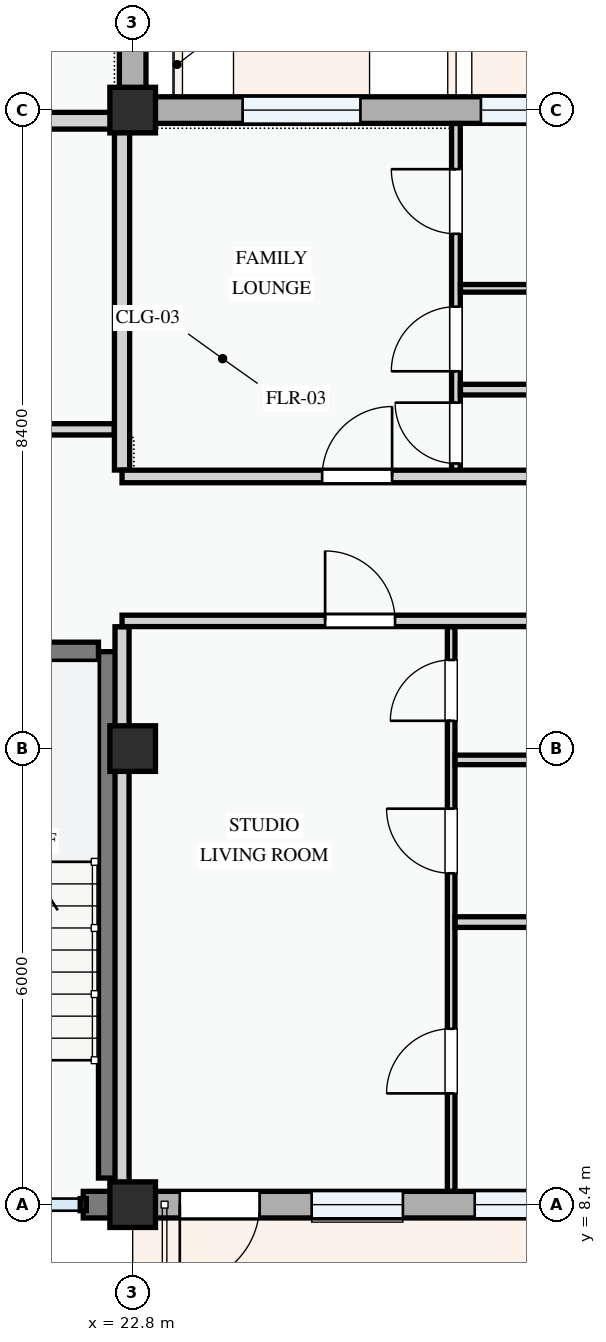
"""IFC4 building model, lengths in metres.
Left out: names, types, materials, properties, quantities, classifications, styles, units other than length and angle.
Written with IfcOpenShell. Run it as: python <this file> out.ifc"""

import sys

from ifc_helpers import new_model, si_unit, direction, frame, frame_2d, origin, origin_2d, place, context, subcontext, project, spatial, rectangle, extrude, element, fill, save


model = new_model("IFC4")
c1 = context("Model", 3, precision=1e-05, world=origin(), true_north=direction((0.0, 1.0)))
c2 = subcontext(c1, "Body", "Model", "MODEL_VIEW")
j1 = project(units=[si_unit("LENGTHUNIT", "METRE"), si_unit("PLANEANGLEUNIT", "RADIAN")], contexts=[c1])
p1 = place(None, origin())
s1 = spatial("IfcSite", under=j1, at=p1, CompositionType="ELEMENT")
p2 = place(p1, origin())
s2 = spatial("IfcBuilding", under=s1, at=p2, CompositionType="ELEMENT")
p3 = place(p2, frame((0.0, 0.0, 8.1)))
s3 = spatial("IfcBuildingStorey", under=s2, at=p3, CompositionType="ELEMENT", Elevation=8.1)
for number, where, z_axis, x_axis in (
    (1, (22.8, 8.4, 0.0), (0.0, 0.0, 1.0), (1.0, 0.0, 0.0)),
    (2, (22.8, 14.4, 0.0), (0.0, 0.0, 1.0), (1.0, 0.0, 0.0)),
    (3, (22.8, 22.8, 0.0), (0.0, 0.0, 1.0), (1.0, 0.0, 0.0)),
):
    element("IfcColumn", number, at=place(p3, frame(where, z_axis=z_axis, x_axis=x_axis)), inside=s3, PredefinedType="COLUMN", context=c2, shape_type="SweptSolid", body=[
        extrude(rectangle(XDim=0.6, YDim=0.6, at=origin_2d()), origin(), (0.0, 0.0, 1.0), 3.3),
    ])
p4 = place(p3, frame((22.8, 22.8, 0.0), z_axis=(0.0, 0.0, 1.0), x_axis=(0.0, 1.0, 0.0)))
e4 = element("IfcWall", 4, at=p4, inside=s3, PredefinedType="STANDARD", context=c2, shape_type="SweptSolid", body=[
    extrude(rectangle(XDim=6.0, YDim=0.35, at=frame_2d((3.0, 0.0))), origin(), (0.0, 0.0, 1.0), 2.575),
])
p5 = place(p4, frame((1.481, 0.0, 0.78)))
e5 = element("IfcOpeningElement", 5, at=p5, cuts=e4, PredefinedType="OPENING", context=c2, shape_type="SweptSolid", body=[
    extrude(rectangle(XDim=1.48, YDim=1.52, at=frame_2d((0.74, 0.76))), frame((0.0, 0.185, 0.0), z_axis=(0.0, -1.0, 0.0), x_axis=(1.0, 0.0, 0.0)), (0.0, 0.0, 1.0), 0.37),
])
p6 = place(p4, frame((4.581, 0.0, 0.78)))
e6 = element("IfcOpeningElement", 6, at=p6, cuts=e4, PredefinedType="OPENING", context=c2, shape_type="SweptSolid", body=[
    extrude(rectangle(XDim=0.9, YDim=1.2, at=frame_2d((0.45, 0.6))), frame((0.0, 0.185, 0.0), z_axis=(0.0, -1.0, 0.0), x_axis=(1.0, 0.0, 0.0)), (0.0, 0.0, 1.0), 0.37),
])
p7 = place(p3, frame((22.15, 8.4, 0.0), z_axis=(0.0, 0.0, 1.0), x_axis=(1.0, 0.0, 0.0)))
e7 = element("IfcWall", 7, at=p7, inside=s3, PredefinedType="STANDARD", context=c2, shape_type="SweptSolid", body=[
    extrude(rectangle(XDim=0.65, YDim=0.35, at=frame_2d((0.325, 0.0))), origin(), (0.0, 0.0, 1.0), 3.04),
])
p8 = place(p3, frame((22.8, 8.4, 0.0), z_axis=(0.0, 0.0, 1.0), x_axis=(1.0, 0.0, 0.0)))
e8 = element("IfcWall", 8, at=p8, inside=s3, PredefinedType="STANDARD", context=c2, shape_type="SweptSolid", body=[
    extrude(rectangle(XDim=6.0, YDim=0.35, at=frame_2d((3.0, 0.0))), origin(), (0.0, 0.0, 1.0), 2.475),
])
p9 = place(p8, frame((0.62, 0.0, 0.0)))
e9 = element("IfcOpeningElement", 9, at=p9, cuts=e8, PredefinedType="OPENING", context=c2, shape_type="SweptSolid", body=[
    extrude(rectangle(XDim=1.05, YDim=2.15, at=frame_2d((0.525, 1.075))), frame((0.0, 0.185, 0.0), z_axis=(0.0, -1.0, 0.0), x_axis=(1.0, 0.0, 0.0)), (0.0, 0.0, 1.0), 0.37),
])
p10 = place(p8, frame((2.355, 0.0, 0.78)))
e10 = element("IfcOpeningElement", 10, at=p10, cuts=e8, PredefinedType="OPENING", context=c2, shape_type="SweptSolid", body=[
    extrude(rectangle(XDim=1.2, YDim=1.5, at=frame_2d((0.6, 0.75))), frame((0.0, 0.185, 0.0), z_axis=(0.0, -1.0, 0.0), x_axis=(1.0, 0.0, 0.0)), (0.0, 0.0, 1.0), 0.37),
])
p11 = place(p8, frame((4.5, 0.0, 0.78)))
e11 = element("IfcOpeningElement", 11, at=p11, cuts=e8, PredefinedType="OPENING", context=c2, shape_type="SweptSolid", body=[
    extrude(rectangle(XDim=1.0, YDim=1.25, at=frame_2d((0.5, 0.625))), frame((0.0, 0.185, 0.0), z_axis=(0.0, -1.0, 0.0), x_axis=(1.0, 0.0, 0.0)), (0.0, 0.0, 1.0), 0.37),
])
p12 = place(p3, frame((28.8, 22.8, 0.0), z_axis=(0.0, 0.0, 1.0), x_axis=(-1.0, 0.0, 0.0)))
e12 = element("IfcWall", 12, at=p12, inside=s3, PredefinedType="STANDARD", context=c2, shape_type="SweptSolid", body=[
    extrude(rectangle(XDim=6.0, YDim=0.35, at=frame_2d((3.0, 0.0))), origin(), (0.0, 0.0, 1.0), 2.475),
])
p13 = place(p12, frame((0.519, 0.0, 0.78)))
e13 = element("IfcOpeningElement", 13, at=p13, cuts=e12, PredefinedType="OPENING", context=c2, shape_type="SweptSolid", body=[
    extrude(rectangle(XDim=0.9, YDim=1.2, at=frame_2d((0.45, 0.6))), frame((0.0, 0.185, 0.0), z_axis=(0.0, -1.0, 0.0), x_axis=(1.0, 0.0, 0.0)), (0.0, 0.0, 1.0), 0.37),
])
p14 = place(p12, frame((3.004, 0.0, 0.78)))
e14 = element("IfcOpeningElement", 14, at=p14, cuts=e12, PredefinedType="OPENING", context=c2, shape_type="SweptSolid", body=[
    extrude(rectangle(XDim=1.55, YDim=1.4, at=frame_2d((0.775, 0.7))), frame((0.0, 0.185, 0.0), z_axis=(0.0, -1.0, 0.0), x_axis=(1.0, 0.0, 0.0)), (0.0, 0.0, 1.0), 0.37),
])
p15 = place(p3, frame((22.475, 8.75, 0.0), z_axis=(0.0, 0.0, 1.0), x_axis=(0.0, 1.0, 0.0)))
e15 = element("IfcWall", 15, at=p15, inside=s3, PredefinedType="SHEAR", context=c2, shape_type="SweptSolid", body=[
    extrude(rectangle(XDim=6.925, YDim=0.25, at=frame_2d((3.462, 0.0))), origin(), (0.0, 0.0, 1.0), 3.0),
])
p16 = place(p3, frame((8.85, 15.675, 0.0), z_axis=(0.0, 0.0, 1.0), x_axis=(1.0, 0.0, 0.0)))
e16 = element("IfcWall", 16, at=p16, inside=s3, PredefinedType="SHEAR", context=c2, shape_type="SweptSolid", body=[
    extrude(rectangle(XDim=13.5, YDim=0.25, at=frame_2d((6.75, 0.0))), origin(), (0.0, 0.0, 1.0), 3.0),
])
p17 = place(p16, frame((6.2, 0.0, 0.0)))
e17 = element("IfcOpeningElement", 17, at=p17, cuts=e16, PredefinedType="OPENING", context=c2, shape_type="SweptSolid", body=[
    extrude(rectangle(XDim=1.1, YDim=2.15, at=frame_2d((0.55, 1.075))), frame((0.0, 0.135, 0.0), z_axis=(0.0, -1.0, 0.0), x_axis=(1.0, 0.0, 0.0)), (0.0, 0.0, 1.0), 0.27),
])
p18 = place(p3, frame((18.025, 18.6, 0.0), z_axis=(0.0, 0.0, 1.0), x_axis=(1.0, 0.0, 0.0)))
e18 = element("IfcWall", 18, at=p18, inside=s3, PredefinedType="PARTITIONING", context=c2, shape_type="SweptSolid", body=[
    extrude(rectangle(XDim=4.533, YDim=0.148, at=frame_2d((2.267, 0.0))), origin(), (0.0, 0.0, 1.0), 3.0),
])
p19 = place(p18, frame((1.65, 0.0, 0.0)))
e19 = element("IfcOpeningElement", 19, at=p19, cuts=e18, PredefinedType="OPENING", context=c2, shape_type="SweptSolid", body=[
    extrude(rectangle(XDim=1.0, YDim=2.15, at=frame_2d((0.5, 1.075))), frame((0.0, 0.084, 0.0), z_axis=(0.0, -1.0, 0.0), x_axis=(1.0, 0.0, 0.0)), (0.0, 0.0, 1.0), 0.168),
])
p20 = place(p3, frame((18.064, 22.66, 0.0), z_axis=(0.0, 0.0, 1.0), x_axis=(1.0, 0.0, 0.0)))
e20 = element("IfcWall", 20, at=p20, inside=s3, PredefinedType="PARTITIONING", context=c2, shape_type="SweptSolid", body=[
    extrude(rectangle(XDim=4.494, YDim=0.22, at=frame_2d((2.247, 0.0))), origin(), (0.0, 0.0, 1.0), 2.375),
])
p21 = place(p3, frame((26.99, 8.577, 0.0), z_axis=(0.0, 0.0, 1.0), x_axis=(0.0, 1.0, 0.0)))
e21 = element("IfcWall", 21, at=p21, inside=s3, PredefinedType="PARTITIONING", context=c2, shape_type="SweptSolid", body=[
    extrude(rectangle(XDim=7.426, YDim=0.1, at=frame_2d((3.713, 0.0))), origin(), (0.0, 0.0, 1.0), 3.0),
])
p22 = place(p21, frame((1.287, 0.0, 0.0)))
e22 = element("IfcOpeningElement", 22, at=p22, cuts=e21, PredefinedType="OPENING", context=c2, shape_type="SweptSolid", body=[
    extrude(rectangle(XDim=0.85, YDim=2.1, at=frame_2d((0.425, 1.05))), frame((0.0, 0.06, 0.0), z_axis=(0.0, -1.0, 0.0), x_axis=(1.0, 0.0, 0.0)), (0.0, 0.0, 1.0), 0.12),
])
p23 = place(p21, frame((4.182, 0.0, 0.0)))
e23 = element("IfcOpeningElement", 23, at=p23, cuts=e21, PredefinedType="OPENING", context=c2, shape_type="SweptSolid", body=[
    extrude(rectangle(XDim=0.85, YDim=2.1, at=frame_2d((0.425, 1.05))), frame((0.0, 0.06, 0.0), z_axis=(0.0, -1.0, 0.0), x_axis=(1.0, 0.0, 0.0)), (0.0, 0.0, 1.0), 0.12),
])
p24 = place(p21, frame((6.189, 0.0, 0.0)))
e24 = element("IfcOpeningElement", 24, at=p24, cuts=e21, PredefinedType="OPENING", context=c2, shape_type="SweptSolid", body=[
    extrude(rectangle(XDim=0.8, YDim=2.1, at=frame_2d((0.4, 1.05))), frame((0.0, 0.06, 0.0), z_axis=(0.0, -1.0, 0.0), x_axis=(1.0, 0.0, 0.0)), (0.0, 0.0, 1.0), 0.12),
])
p25 = place(p3, frame((27.042, 12.118, 0.0), z_axis=(0.0, 0.0, 1.0), x_axis=(1.0, 0.0, 0.0)))
e25 = element("IfcWall", 25, at=p25, inside=s3, PredefinedType="PARTITIONING", context=c2, shape_type="SweptSolid", body=[
    extrude(rectangle(XDim=7.366, YDim=0.14, at=frame_2d((3.683, 0.0))), origin(), (0.0, 0.0, 1.0), 3.0),
])
p26 = place(p3, frame((27.042, 14.251, 0.0), z_axis=(0.0, 0.0, 1.0), x_axis=(1.0, 0.0, 0.0)))
e26 = element("IfcWall", 26, at=p26, inside=s3, PredefinedType="PARTITIONING", context=c2, shape_type="SweptSolid", body=[
    extrude(rectangle(XDim=7.366, YDim=0.125, at=frame_2d((3.683, 0.0))), origin(), (0.0, 0.0, 1.0), 2.375),
])
p27 = place(p3, frame((27.053, 17.98, 0.0), z_axis=(0.0, 0.0, 1.0), x_axis=(0.0, 1.0, 0.0)))
e27 = element("IfcWall", 27, at=p27, inside=s3, PredefinedType="PARTITIONING", context=c2, shape_type="SweptSolid", body=[
    extrude(rectangle(XDim=4.643, YDim=0.115, at=frame_2d((2.322, 0.0))), origin(), (0.0, 0.0, 1.0), 3.0),
])
p28 = place(p27, frame((0.171, 0.0, 0.0)))
e28 = element("IfcOpeningElement", 28, at=p28, cuts=e27, PredefinedType="OPENING", context=c2, shape_type="SweptSolid", body=[
    extrude(rectangle(XDim=0.8, YDim=2.1, at=frame_2d((0.4, 1.05))), frame((0.0, 0.067, 0.0), z_axis=(0.0, -1.0, 0.0), x_axis=(1.0, 0.0, 0.0)), (0.0, 0.0, 1.0), 0.135),
])
p29 = place(p27, frame((1.384, 0.0, 0.0)))
e29 = element("IfcOpeningElement", 29, at=p29, cuts=e27, PredefinedType="OPENING", context=c2, shape_type="SweptSolid", body=[
    extrude(rectangle(XDim=0.85, YDim=2.1, at=frame_2d((0.425, 1.05))), frame((0.0, 0.067, 0.0), z_axis=(0.0, -1.0, 0.0), x_axis=(1.0, 0.0, 0.0)), (0.0, 0.0, 1.0), 0.135),
])
p30 = place(p27, frame((3.193, 0.0, 0.0)))
e30 = element("IfcOpeningElement", 30, at=p30, cuts=e27, PredefinedType="OPENING", context=c2, shape_type="SweptSolid", body=[
    extrude(rectangle(XDim=0.85, YDim=2.1, at=frame_2d((0.425, 1.05))), frame((0.0, 0.067, 0.0), z_axis=(0.0, -1.0, 0.0), x_axis=(1.0, 0.0, 0.0)), (0.0, 0.0, 1.0), 0.135),
])
p31 = place(p3, frame((27.112, 20.455, 0.0), z_axis=(0.0, 0.0, 1.0), x_axis=(1.0, 0.0, 0.0)))
e31 = element("IfcWall", 31, at=p31, inside=s3, PredefinedType="PARTITIONING", context=c2, shape_type="SweptSolid", body=[
    extrude(rectangle(XDim=7.313, YDim=0.1, at=frame_2d((3.657, 0.0))), origin(), (0.0, 0.0, 1.0), 3.0),
])
p32 = place(p3, frame((27.112, 19.122, 0.0), z_axis=(0.0, 0.0, 1.0), x_axis=(1.0, 0.0, 0.0)))
e32 = element("IfcWall", 32, at=p32, inside=s3, PredefinedType="PARTITIONING", context=c2, shape_type="SweptSolid", body=[
    extrude(rectangle(XDim=7.313, YDim=0.14, at=frame_2d((3.657, 0.0))), origin(), (0.0, 0.0, 1.0), 3.0),
])
p33 = place(p3, frame((22.66, 8.577, 0.0), z_axis=(0.0, 0.0, 1.0), x_axis=(0.0, 1.0, 0.0)))
e33 = element("IfcWall", 33, at=p33, inside=s3, PredefinedType="PARTITIONING", context=c2, shape_type="SweptSolid", body=[
    extrude(rectangle(XDim=7.426, YDim=0.185, at=frame_2d((3.713, 0.0))), origin(), (0.0, 0.0, 1.0), 2.425),
])
p34 = place(p3, frame((22.66, 18.064, 0.0), z_axis=(0.0, 0.0, 1.0), x_axis=(0.0, 1.0, 0.0)))
e34 = element("IfcWall", 34, at=p34, inside=s3, PredefinedType="PARTITIONING", context=c2, shape_type="SweptSolid", body=[
    extrude(rectangle(XDim=4.676, YDim=0.2, at=frame_2d((2.338, 0.0))), origin(), (0.0, 0.0, 1.0), 2.425),
])
p35 = place(p3, frame((22.66, 16.08, 0.0), z_axis=(0.0, 0.0, 1.0), x_axis=(1.0, 0.0, 0.0)))
e35 = element("IfcWall", 35, at=p35, inside=s3, PredefinedType="PARTITIONING", context=c2, shape_type="SweptSolid", body=[
    extrude(rectangle(XDim=34.763, YDim=0.15, at=frame_2d((17.382, 0.0))), origin(), (0.0, 0.0, 1.0), 3.0),
])
p36 = place(p35, frame((2.672, 0.0, 0.0)))
e36 = element("IfcOpeningElement", 36, at=p36, cuts=e35, PredefinedType="OPENING", context=c2, shape_type="SweptSolid", body=[
    extrude(rectangle(XDim=0.92, YDim=2.1, at=frame_2d((0.46, 1.05))), frame((0.0, 0.085, 0.0), z_axis=(0.0, -1.0, 0.0), x_axis=(1.0, 0.0, 0.0)), (0.0, 0.0, 1.0), 0.17),
])
p37 = place(p35, frame((16.58, 0.0, 0.0)))
e37 = element("IfcOpeningElement", 37, at=p37, cuts=e35, PredefinedType="OPENING", context=c2, shape_type="SweptSolid", body=[
    extrude(rectangle(XDim=0.96, YDim=2.12, at=frame_2d((0.48, 1.06))), frame((0.0, 0.085, 0.0), z_axis=(0.0, -1.0, 0.0), x_axis=(1.0, 0.0, 0.0)), (0.0, 0.0, 1.0), 0.17),
])
p38 = place(p35, frame((24.315, 0.0, 0.0)))
e38 = element("IfcOpeningElement", 38, at=p38, cuts=e35, PredefinedType="OPENING", context=c2, shape_type="SweptSolid", body=[
    extrude(rectangle(XDim=0.92, YDim=2.1, at=frame_2d((0.46, 1.05))), frame((0.0, 0.085, 0.0), z_axis=(0.0, -1.0, 0.0), x_axis=(1.0, 0.0, 0.0)), (0.0, 0.0, 1.0), 0.17),
])
p39 = place(p3, frame((22.66, 17.98, 0.0), z_axis=(0.0, 0.0, 1.0), x_axis=(1.0, 0.0, 0.0)))
e39 = element("IfcWall", 39, at=p39, inside=s3, PredefinedType="PARTITIONING", context=c2, shape_type="SweptSolid", body=[
    extrude(rectangle(XDim=34.763, YDim=0.165, at=frame_2d((17.382, 0.0))), origin(), (0.0, 0.0, 1.0), 3.0),
])
p40 = place(p39, frame((2.633, 0.0, 0.0)))
e40 = element("IfcOpeningElement", 40, at=p40, cuts=e39, PredefinedType="OPENING", context=c2, shape_type="SweptSolid", body=[
    extrude(rectangle(XDim=0.92, YDim=2.1, at=frame_2d((0.46, 1.05))), frame((0.0, 0.093, 0.0), z_axis=(0.0, -1.0, 0.0), x_axis=(1.0, 0.0, 0.0)), (0.0, 0.0, 1.0), 0.185),
])
p41 = place(p39, frame((16.343, 0.0, 0.0)))
e41 = element("IfcOpeningElement", 41, at=p41, cuts=e39, PredefinedType="OPENING", context=c2, shape_type="SweptSolid", body=[
    extrude(rectangle(XDim=0.92, YDim=2.1, at=frame_2d((0.46, 1.05))), frame((0.0, 0.093, 0.0), z_axis=(0.0, -1.0, 0.0), x_axis=(1.0, 0.0, 0.0)), (0.0, 0.0, 1.0), 0.185),
])
p42 = place(p39, frame((24.313, 0.0, 0.0)))
e42 = element("IfcOpeningElement", 42, at=p42, cuts=e39, PredefinedType="OPENING", context=c2, shape_type="SweptSolid", body=[
    extrude(rectangle(XDim=0.92, YDim=2.1, at=frame_2d((0.46, 1.05))), frame((0.0, 0.093, 0.0), z_axis=(0.0, -1.0, 0.0), x_axis=(1.0, 0.0, 0.0)), (0.0, 0.0, 1.0), 0.185),
])
p43 = place(p9, frame((1.05, 0.0, 0.0), z_axis=(0.0, 0.0, 1.0), x_axis=(-1.0, 0.0, 0.0)))
e43 = element("IfcDoor", 43, at=p43, inside=s3, OperationType="SINGLE_SWING_RIGHT", PredefinedType="DOOR", context=c2, shape_type="SweptSolid", body=[
    extrude(rectangle(XDim=1.05, YDim=2.15, at=frame_2d((0.525, 1.075))), frame((0.0, 0.025, 0.0), z_axis=(0.0, -1.0, 0.0), x_axis=(1.0, 0.0, 0.0)), (0.0, 0.0, 1.0), 0.05),
])
fill(e9, e43)
p44 = place(p10, origin())
e44 = element("IfcWindow", 44, at=p44, inside=s3, PartitioningType="SINGLE_PANEL", PredefinedType="WINDOW", context=c2, shape_type="SweptSolid", body=[
    extrude(rectangle(XDim=1.2, YDim=1.5, at=frame_2d((0.6, 0.75))), frame((0.0, 0.03, 0.0), z_axis=(0.0, -1.0, 0.0), x_axis=(1.0, 0.0, 0.0)), (0.0, 0.0, 1.0), 0.06),
])
fill(e10, e44)
p45 = place(p11, origin())
e45 = element("IfcWindow", 45, at=p45, inside=s3, PartitioningType="SINGLE_PANEL", PredefinedType="WINDOW", context=c2, shape_type="SweptSolid", body=[
    extrude(rectangle(XDim=1.0, YDim=1.25, at=frame_2d((0.5, 0.625))), frame((0.0, 0.03, 0.0), z_axis=(0.0, -1.0, 0.0), x_axis=(1.0, 0.0, 0.0)), (0.0, 0.0, 1.0), 0.06),
])
fill(e11, e45)
p46 = place(p13, origin())
e46 = element("IfcWindow", 46, at=p46, inside=s3, PartitioningType="SINGLE_PANEL", PredefinedType="WINDOW", context=c2, shape_type="SweptSolid", body=[
    extrude(rectangle(XDim=0.9, YDim=1.2, at=frame_2d((0.45, 0.6))), frame((0.0, 0.03, 0.0), z_axis=(0.0, -1.0, 0.0), x_axis=(1.0, 0.0, 0.0)), (0.0, 0.0, 1.0), 0.06),
])
fill(e13, e46)
p47 = place(p14, origin())
e47 = element("IfcWindow", 47, at=p47, inside=s3, PartitioningType="SINGLE_PANEL", PredefinedType="WINDOW", context=c2, shape_type="SweptSolid", body=[
    extrude(rectangle(XDim=1.55, YDim=1.4, at=frame_2d((0.775, 0.7))), frame((0.0, 0.03, 0.0), z_axis=(0.0, -1.0, 0.0), x_axis=(1.0, 0.0, 0.0)), (0.0, 0.0, 1.0), 0.06),
])
fill(e14, e47)
p48 = place(p22, origin())
e48 = element("IfcDoor", 48, at=p48, inside=s3, OperationType="SINGLE_SWING_LEFT", PredefinedType="DOOR", context=c2, shape_type="SweptSolid", body=[
    extrude(rectangle(XDim=0.85, YDim=2.1, at=frame_2d((0.425, 1.05))), frame((0.0, 0.025, 0.0), z_axis=(0.0, -1.0, 0.0), x_axis=(1.0, 0.0, 0.0)), (0.0, 0.0, 1.0), 0.05),
])
fill(e22, e48)
p49 = place(p23, origin())
e49 = element("IfcDoor", 49, at=p49, inside=s3, OperationType="SINGLE_SWING_RIGHT", PredefinedType="DOOR", context=c2, shape_type="SweptSolid", body=[
    extrude(rectangle(XDim=0.85, YDim=2.1, at=frame_2d((0.425, 1.05))), frame((0.0, 0.025, 0.0), z_axis=(0.0, -1.0, 0.0), x_axis=(1.0, 0.0, 0.0)), (0.0, 0.0, 1.0), 0.05),
])
fill(e23, e49)
p50 = place(p24, origin())
e50 = element("IfcDoor", 50, at=p50, inside=s3, OperationType="SINGLE_SWING_LEFT", PredefinedType="DOOR", context=c2, shape_type="SweptSolid", body=[
    extrude(rectangle(XDim=0.8, YDim=2.1, at=frame_2d((0.4, 1.05))), frame((0.0, 0.025, 0.0), z_axis=(0.0, -1.0, 0.0), x_axis=(1.0, 0.0, 0.0)), (0.0, 0.0, 1.0), 0.05),
])
fill(e24, e50)
p51 = place(p28, origin())
e51 = element("IfcDoor", 51, at=p51, inside=s3, OperationType="SINGLE_SWING_RIGHT", PredefinedType="DOOR", context=c2, shape_type="SweptSolid", body=[
    extrude(rectangle(XDim=0.8, YDim=2.1, at=frame_2d((0.4, 1.05))), frame((0.0, 0.025, 0.0), z_axis=(0.0, -1.0, 0.0), x_axis=(1.0, 0.0, 0.0)), (0.0, 0.0, 1.0), 0.05),
])
fill(e28, e51)
p52 = place(p29, origin())
e52 = element("IfcDoor", 52, at=p52, inside=s3, OperationType="SINGLE_SWING_LEFT", PredefinedType="DOOR", context=c2, shape_type="SweptSolid", body=[
    extrude(rectangle(XDim=0.85, YDim=2.1, at=frame_2d((0.425, 1.05))), frame((0.0, 0.025, 0.0), z_axis=(0.0, -1.0, 0.0), x_axis=(1.0, 0.0, 0.0)), (0.0, 0.0, 1.0), 0.05),
])
fill(e29, e52)
p53 = place(p30, origin())
e53 = element("IfcDoor", 53, at=p53, inside=s3, OperationType="SINGLE_SWING_RIGHT", PredefinedType="DOOR", context=c2, shape_type="SweptSolid", body=[
    extrude(rectangle(XDim=0.85, YDim=2.1, at=frame_2d((0.425, 1.05))), frame((0.0, 0.025, 0.0), z_axis=(0.0, -1.0, 0.0), x_axis=(1.0, 0.0, 0.0)), (0.0, 0.0, 1.0), 0.05),
])
fill(e30, e53)
p54 = place(p36, origin())
e54 = element("IfcDoor", 54, at=p54, inside=s3, OperationType="SINGLE_SWING_LEFT", PredefinedType="DOOR", context=c2, shape_type="SweptSolid", body=[
    extrude(rectangle(XDim=0.92, YDim=2.1, at=frame_2d((0.46, 1.05))), frame((0.0, 0.025, 0.0), z_axis=(0.0, -1.0, 0.0), x_axis=(1.0, 0.0, 0.0)), (0.0, 0.0, 1.0), 0.05),
])
fill(e36, e54)
p55 = place(p40, origin())
e55 = element("IfcDoor", 55, at=p55, inside=s3, OperationType="SINGLE_SWING_RIGHT", PredefinedType="DOOR", context=c2, shape_type="SweptSolid", body=[
    extrude(rectangle(XDim=0.92, YDim=2.1, at=frame_2d((0.46, 1.05))), frame((0.0, 0.025, 0.0), z_axis=(0.0, -1.0, 0.0), x_axis=(1.0, 0.0, 0.0)), (0.0, 0.0, 1.0), 0.05),
])
fill(e40, e55)
save(model, sys.argv[1])
